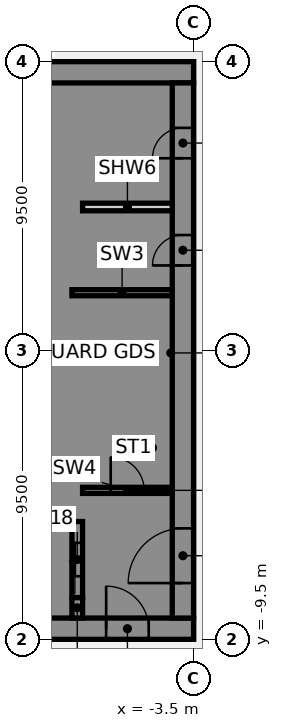
"""IFC4 building model, lengths in metres.
Left out: names, types, materials, properties, quantities, classifications, styles, units other than length and angle.
Written with IfcOpenShell. Run it as: python <this file> out.ifc"""

import sys

from ifc_helpers import new_model, si_unit, direction, frame, frame_2d, origin, place, context, subcontext, project, spatial, polyline, rectangle, outline, extrude, element, fill, save


model = new_model("IFC4")
c1 = context("Model", 3, precision=1e-05, world=origin(), true_north=direction((0.0, 1.0)))
c2 = subcontext(c1, "Body", "Model", "MODEL_VIEW")
j1 = project(units=[si_unit("LENGTHUNIT", "METRE"), si_unit("PLANEANGLEUNIT", "RADIAN")], contexts=[c1])
p1 = place(None, origin())
s1 = spatial("IfcSite", under=j1, at=p1, CompositionType="ELEMENT")
p2 = place(p1, origin())
s2 = spatial("IfcBuilding", under=s1, at=p2, CompositionType="ELEMENT")
p3 = place(p2, frame((0.0, 0.0, 79.0)))
s3 = spatial("IfcBuildingStorey", under=s2, at=p3, CompositionType="ELEMENT", Elevation=79.0)
p4 = place(p3, frame((-16.5, -9.15, 0.0), z_axis=(0.0, 0.0, 1.0), x_axis=(1.0, 0.0, 0.0)))
e1 = element("IfcWall", 1, at=p4, inside=s3, PredefinedType="SHEAR", context=c2, shape_type="SweptSolid", body=[
    extrude(rectangle(XDim=13.0, YDim=0.7, at=frame_2d((6.5, 0.0))), origin(), (0.0, 0.0, 1.0), 4.36),
])
p5 = place(p4, frame((4.15, 0.0, 0.0)))
e2 = element("IfcOpeningElement", 2, at=p5, cuts=e1, PredefinedType="OPENING", context=c2, shape_type="SweptSolid", body=[
    extrude(rectangle(XDim=1.4, YDim=2.1, at=frame_2d((0.7, 1.05))), frame((0.0, 0.36, 0.0), z_axis=(0.0, -1.0, 0.0), x_axis=(1.0, 0.0, 0.0)), (0.0, 0.0, 1.0), 0.72),
])
p6 = place(p4, frame((10.125, 0.0, 0.0)))
e3 = element("IfcOpeningElement", 3, at=p6, cuts=e1, PredefinedType="OPENING", context=c2, shape_type="SweptSolid", body=[
    extrude(rectangle(XDim=1.4, YDim=2.1, at=frame_2d((0.7, 1.05))), frame((0.0, 0.36, 0.0), z_axis=(0.0, -1.0, 0.0), x_axis=(1.0, 0.0, 0.0)), (0.0, 0.0, 1.0), 0.72),
])
p7 = place(p3, frame((-16.5, 9.15, 0.0), z_axis=(0.0, 0.0, 1.0), x_axis=(1.0, 0.0, 0.0)))
e4 = element("IfcWall", 4, at=p7, inside=s3, PredefinedType="SHEAR", context=c2, shape_type="SweptSolid", body=[
    extrude(rectangle(XDim=13.0, YDim=0.7, at=frame_2d((6.5, 0.0))), origin(), (0.0, 0.0, 1.0), 4.36),
])
p8 = place(p7, frame((4.15, 0.0, 0.0)))
e5 = element("IfcOpeningElement", 5, at=p8, cuts=e4, PredefinedType="OPENING", context=c2, shape_type="SweptSolid", body=[
    extrude(rectangle(XDim=1.4, YDim=2.1, at=frame_2d((0.7, 1.05))), frame((0.0, 0.36, 0.0), z_axis=(0.0, -1.0, 0.0), x_axis=(1.0, 0.0, 0.0)), (0.0, 0.0, 1.0), 0.72),
])
p9 = place(p3, origin())
e6 = element("IfcWall", 6, at=p9, inside=s3, PredefinedType="SHEAR", context=c2, shape_type="SweptSolid", body=[
    extrude(outline(polyline([(-9.8, -5.375), (-9.8, -5.625), (-7.5, -5.625), (-7.15, -5.625), (-7.15, 8.8), (-7.5, 8.8), (-9.8, 8.8), (-9.8, 8.125), (-7.5, 8.125), (-7.5, 5.625), (-9.8, 5.625), (-9.8, 5.375), (-7.5, 5.375), (-7.5, 2.875), (-9.8, 2.875), (-9.8, 2.625), (-7.5, 2.625), (-7.5, 0.125), (-9.8, 0.125), (-9.8, -0.125), (-7.5, -0.125), (-7.5, -2.625), (-9.8, -2.625), (-9.8, -2.875), (-7.5, -2.875), (-7.5, -5.375), (-9.8, -5.375)])), origin(), (0.0, 0.0, 1.0), 4.36),
])
p10 = place(p3, origin())
e7 = element("IfcWall", 7, at=p10, inside=s3, PredefinedType="SHEAR", context=c2, shape_type="SweptSolid", body=[
    extrude(outline(polyline([(-7.5, -8.125), (-9.55, -8.125), (-9.55, -5.625), (-9.8, -5.625), (-9.8, -8.125), (-9.8, -8.8), (-7.5, -8.8), (-7.5, -8.125)])), origin(), (0.0, 0.0, 1.0), 4.36),
])
p11 = place(p3, frame((-7.325, -8.8, 0.0), z_axis=(0.0, 0.0, 1.0), x_axis=(0.0, 1.0, 0.0)))
e8 = element("IfcWall", 8, at=p11, inside=s3, PredefinedType="SHEAR", context=c2, shape_type="SweptSolid", body=[
    extrude(rectangle(XDim=0.675, YDim=0.35, at=frame_2d((0.337, 0.0))), origin(), (0.0, 0.0, 1.0), 4.36),
])
p12 = place(p3, frame((-7.5, 1.9, 0.0), z_axis=(0.0, 0.0, 1.0), x_axis=(1.0, 0.0, 0.0)))
e9 = element("IfcWall", 9, at=p12, inside=s3, PredefinedType="SHEAR", context=c2, shape_type="SweptSolid", body=[
    extrude(rectangle(XDim=3.3, YDim=0.2, at=frame_2d((1.65, 0.0))), origin(), (0.0, 0.0, 1.0), 4.36),
])
p13 = place(p3, frame((-7.325, -8.125, 0.0), z_axis=(0.0, 0.0, 1.0), x_axis=(0.0, 1.0, 0.0)))
e10 = element("IfcWall", 10, at=p13, inside=s3, PredefinedType="SHEAR", context=c2, shape_type="SweptSolid", body=[
    extrude(rectangle(XDim=2.5, YDim=0.35, at=frame_2d((1.25, 0.0))), origin(), (0.0, 0.0, 1.0), 4.36),
])
p14 = place(p13, frame((0.7, 0.0, 0.0)))
e11 = element("IfcOpeningElement", 11, at=p14, cuts=e10, PredefinedType="OPENING", context=c2, shape_type="SweptSolid", body=[
    extrude(rectangle(XDim=1.1, YDim=2.1, at=frame_2d((0.55, 1.05))), frame((0.0, 0.185, 0.0), z_axis=(0.0, -1.0, 0.0), x_axis=(1.0, 0.0, 0.0)), (0.0, 0.0, 1.0), 0.37),
])
p15 = place(p3, frame((-3.85, -8.8, 0.0), z_axis=(0.0, 0.0, 1.0), x_axis=(0.0, 1.0, 0.0)))
e12 = element("IfcWall", 12, at=p15, inside=s3, PredefinedType="SHEAR", context=c2, shape_type="SweptSolid", body=[
    extrude(rectangle(XDim=17.6, YDim=0.7, at=frame_2d((8.8, 0.0))), origin(), (0.0, 0.0, 1.0), 4.36),
])
p16 = place(p15, frame((1.15, 0.0, 0.0)))
e13 = element("IfcOpeningElement", 13, at=p16, cuts=e12, PredefinedType="OPENING", context=c2, shape_type="SweptSolid", body=[
    extrude(rectangle(XDim=1.8, YDim=2.1, at=frame_2d((0.9, 1.05))), frame((0.0, 0.36, 0.0), z_axis=(0.0, -1.0, 0.0), x_axis=(1.0, 0.0, 0.0)), (0.0, 0.0, 1.0), 0.72),
])
p17 = place(p15, frame((11.597, 0.0, 0.0)))
e14 = element("IfcOpeningElement", 14, at=p17, cuts=e12, PredefinedType="OPENING", context=c2, shape_type="SweptSolid", body=[
    extrude(rectangle(XDim=1.0, YDim=2.1, at=frame_2d((0.5, 1.05))), frame((0.0, 0.36, 0.0), z_axis=(0.0, -1.0, 0.0), x_axis=(1.0, 0.0, 0.0)), (0.0, 0.0, 1.0), 0.72),
])
p18 = place(p15, frame((15.123, 0.0, 0.0)))
e15 = element("IfcOpeningElement", 15, at=p18, cuts=e12, PredefinedType="OPENING", context=c2, shape_type="SweptSolid", body=[
    extrude(rectangle(XDim=1.0, YDim=2.1, at=frame_2d((0.5, 1.05))), frame((0.0, 0.36, 0.0), z_axis=(0.0, -1.0, 0.0), x_axis=(1.0, 0.0, 0.0)), (0.0, 0.0, 1.0), 0.72),
])
p19 = place(p3, frame((-7.15, 4.72, 0.0), z_axis=(0.0, 0.0, 1.0), x_axis=(1.0, 0.0, 0.0)))
e16 = element("IfcWall", 16, at=p19, inside=s3, PredefinedType="PARTITIONING", context=c2, shape_type="SweptSolid", body=[
    extrude(rectangle(XDim=2.95, YDim=0.25, at=frame_2d((1.475, 0.0))), origin(), (0.0, 0.0, 1.0), 4.36),
])
p20 = place(p3, frame((-7.15, -4.6, 0.0), z_axis=(0.0, 0.0, 1.0), x_axis=(1.0, 0.0, 0.0)))
e17 = element("IfcWall", 17, at=p20, inside=s3, PredefinedType="SHEAR", context=c2, shape_type="SweptSolid", body=[
    extrude(rectangle(XDim=2.95, YDim=0.2, at=frame_2d((1.475, 0.0))), origin(), (0.0, 0.0, 1.0), 4.36),
])
p21 = place(p20, frame((0.925, 0.0, 0.0)))
e18 = element("IfcOpeningElement", 18, at=p21, cuts=e17, PredefinedType="OPENING", context=c2, shape_type="SweptSolid", body=[
    extrude(rectangle(XDim=1.1, YDim=2.1, at=frame_2d((0.55, 1.05))), frame((0.0, 0.11, 0.0), z_axis=(0.0, -1.0, 0.0), x_axis=(1.0, 0.0, 0.0)), (0.0, 0.0, 1.0), 0.22),
])
p22 = place(p6, origin())
e19 = element("IfcDoor", 19, at=p22, inside=s3, OperationType="SINGLE_SWING_LEFT", PredefinedType="DOOR", context=c2, shape_type="SweptSolid", body=[
    extrude(rectangle(XDim=1.4, YDim=2.1, at=frame_2d((0.7, 1.05))), frame((0.0, 0.025, 0.0), z_axis=(0.0, -1.0, 0.0), x_axis=(1.0, 0.0, 0.0)), (0.0, 0.0, 1.0), 0.05),
])
fill(e3, e19)
p23 = place(p16, origin())
e20 = element("IfcDoor", 20, at=p23, inside=s3, OperationType="SINGLE_SWING_LEFT", PredefinedType="DOOR", context=c2, shape_type="SweptSolid", body=[
    extrude(rectangle(XDim=1.8, YDim=2.1, at=frame_2d((0.9, 1.05))), frame((0.0, 0.025, 0.0), z_axis=(0.0, -1.0, 0.0), x_axis=(1.0, 0.0, 0.0)), (0.0, 0.0, 1.0), 0.05),
])
fill(e13, e20)
p24 = place(p17, origin())
e21 = element("IfcDoor", 21, at=p24, inside=s3, OperationType="SINGLE_SWING_LEFT", PredefinedType="DOOR", context=c2, shape_type="SweptSolid", body=[
    extrude(rectangle(XDim=1.0, YDim=2.1, at=frame_2d((0.5, 1.05))), frame((0.0, 0.325, 0.0), z_axis=(0.0, -1.0, 0.0), x_axis=(1.0, 0.0, 0.0)), (0.0, 0.0, 1.0), 0.05),
])
fill(e14, e21)
p25 = place(p18, origin())
e22 = element("IfcDoor", 22, at=p25, inside=s3, OperationType="SINGLE_SWING_LEFT", PredefinedType="DOOR", context=c2, shape_type="SweptSolid", body=[
    extrude(rectangle(XDim=1.0, YDim=2.1, at=frame_2d((0.5, 1.05))), frame((0.0, 0.325, 0.0), z_axis=(0.0, -1.0, 0.0), x_axis=(1.0, 0.0, 0.0)), (0.0, 0.0, 1.0), 0.05),
])
fill(e15, e22)
p26 = place(p21, origin())
e23 = element("IfcDoor", 23, at=p26, inside=s3, OperationType="SINGLE_SWING_LEFT", PredefinedType="DOOR", context=c2, shape_type="SweptSolid", body=[
    extrude(rectangle(XDim=1.1, YDim=2.1, at=frame_2d((0.55, 1.05))), frame((0.0, 0.025, 0.0), z_axis=(0.0, -1.0, 0.0), x_axis=(1.0, 0.0, 0.0)), (0.0, 0.0, 1.0), 0.05),
])
fill(e18, e23)
p27 = place(p14, origin())
e24 = element("IfcDoor", 24, at=p27, inside=s3, OperationType="SLIDING_TO_LEFT", PredefinedType="DOOR", context=c2, shape_type="SweptSolid", body=[
    extrude(rectangle(XDim=1.1, YDim=2.1, at=frame_2d((0.55, 1.05))), frame((0.0, 0.025, 0.0), z_axis=(0.0, -1.0, 0.0), x_axis=(1.0, 0.0, 0.0)), (0.0, 0.0, 1.0), 0.05),
])
fill(e11, e24)
save(model, sys.argv[1])
